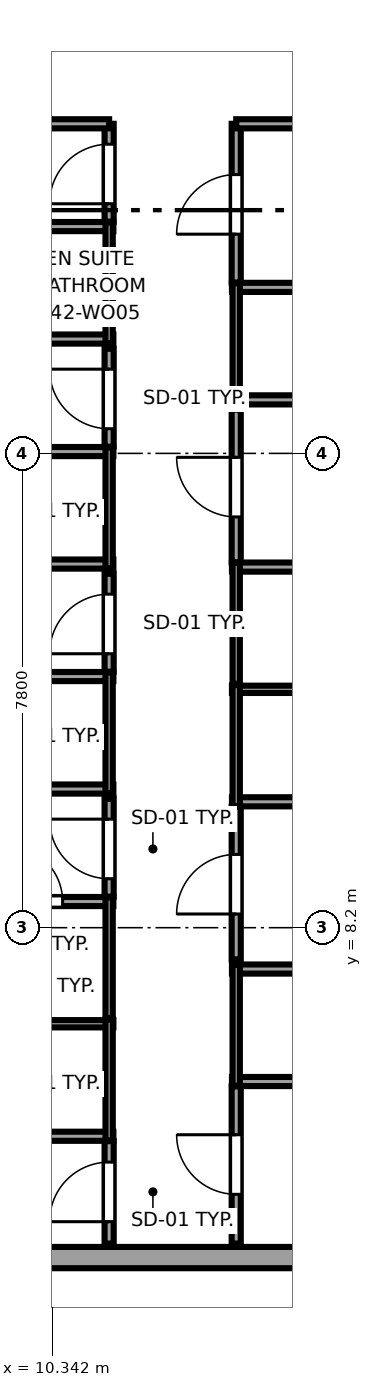
"""IFC4 building model, lengths in metres.
Left out: names, types, materials, properties, quantities, classifications, styles, units other than length and angle.
Written with IfcOpenShell. Run it as: python <this file> out.ifc"""

import sys

from ifc_helpers import new_model, si_unit, direction, frame, frame_2d, origin, place, context, subcontext, project, spatial, rectangle, extrude, source, transform, mapped, element, fill, save


model = new_model("IFC4")
c1 = context("Model", 3, precision=1e-05, world=origin(), true_north=direction((0.0, 1.0)))
c2 = subcontext(c1, "Body", "Model", "MODEL_VIEW")
j1 = project(units=[si_unit("LENGTHUNIT", "METRE"), si_unit("PLANEANGLEUNIT", "RADIAN")], contexts=[c1])
p1 = place(None, origin())
s1 = spatial("IfcSite", under=j1, at=p1, CompositionType="ELEMENT")
p2 = place(p1, origin())
s2 = spatial("IfcBuilding", under=s1, at=p2, CompositionType="ELEMENT")
p3 = place(p2, frame((0.0, 0.0, 161.25)))
s3 = spatial("IfcBuildingStorey", under=s2, at=p3, CompositionType="ELEMENT", Elevation=161.25)
p4 = place(p3, frame((7.017, 2.775, 0.0), z_axis=(0.0, 0.0, 1.0), x_axis=(1.0, 0.0, 0.0)))
e1 = element("IfcWall", 1, at=p4, inside=s3, PredefinedType="SOLIDWALL", context=c2, shape_type="SweptSolid", body=[
    extrude(rectangle(XDim=15.608, YDim=0.35, at=frame_2d((7.804, 0.0))), origin(), (0.0, 0.0, 1.0), 3.37),
])
p5 = place(p4, frame((11.332, 0.0, 0.68)))
e2 = element("IfcOpeningElement", 2, at=p5, cuts=e1, PredefinedType="OPENING", context=c2, shape_type="SweptSolid", body=[
    extrude(rectangle(XDim=2.55, YDim=1.92, at=frame_2d((1.275, 0.96))), frame((0.0, 0.185, 0.0), z_axis=(0.0, -1.0, 0.0), x_axis=(1.0, 0.0, 0.0)), (0.0, 0.0, 1.0), 0.37),
])
p6 = place(p4, frame((1.466, 0.0, 0.62)))
e3 = element("IfcOpeningElement", 3, at=p6, cuts=e1, PredefinedType="OPENING", context=c2, shape_type="SweptSolid", body=[
    extrude(rectangle(XDim=1.5, YDim=1.55, at=frame_2d((0.75, 0.775))), frame((0.0, 0.185, 0.0), z_axis=(0.0, -1.0, 0.0), x_axis=(1.0, 0.0, 0.0)), (0.0, 0.0, 1.0), 0.37),
])
p7 = place(p3, frame((8.76, 4.77, 0.0), z_axis=(0.0, 0.0, 1.0), x_axis=(1.0, 0.0, 0.0)))
e4 = element("IfcWall", 4, at=p7, inside=s3, PredefinedType="PARTITIONING", context=c2, shape_type="SweptSolid", body=[
    extrude(rectangle(XDim=2.59, YDim=0.15, at=frame_2d((1.295, 0.0))), origin(), (0.0, 0.0, 1.0), 3.37),
])
p8 = place(p3, frame((8.76, 6.62, 0.0), z_axis=(0.0, 0.0, 1.0), x_axis=(1.0, 0.0, 0.0)))
e5 = element("IfcWall", 5, at=p8, inside=s3, PredefinedType="PLUMBINGWALL", context=c2, shape_type="SweptSolid", body=[
    extrude(rectangle(XDim=2.59, YDim=0.12, at=frame_2d((1.295, 0.0))), origin(), (0.0, 0.0, 1.0), 3.37),
])
p9 = place(p3, frame((11.28, 4.7, 0.0), z_axis=(0.0, 0.0, 1.0), x_axis=(0.0, 1.0, 0.0)))
e6 = element("IfcWall", 6, at=p9, inside=s3, PredefinedType="PLUMBINGWALL", context=c2, shape_type="SweptSolid", body=[
    extrude(rectangle(XDim=1.99, YDim=0.12, at=frame_2d((0.995, 0.0))), origin(), (0.0, 0.0, 1.0), 3.37),
])
p10 = place(p3, frame((8.76, 8.63, 0.0), z_axis=(0.0, 0.0, 1.0), x_axis=(1.0, 0.0, 0.0)))
e7 = element("IfcWall", 7, at=p10, inside=s3, PredefinedType="PARTITIONING", context=c2, shape_type="SweptSolid", body=[
    extrude(rectangle(XDim=2.59, YDim=0.15, at=frame_2d((1.295, 0.0))), origin(), (0.0, 0.0, 1.0), 3.37),
])
p11 = place(p10, frame((0.835, 0.0, 0.0)))
e8 = element("IfcOpeningElement", 8, at=p11, cuts=e7, PredefinedType="OPENING", context=c2, shape_type="SweptSolid", body=[
    extrude(rectangle(XDim=0.92, YDim=2.01, at=frame_2d((0.46, 1.005))), frame((0.0, 0.085, 0.0), z_axis=(0.0, -1.0, 0.0), x_axis=(1.0, 0.0, 0.0)), (0.0, 0.0, 1.0), 0.17),
])
p12 = place(p3, frame((11.28, 6.71, 0.0), z_axis=(0.0, 0.0, 1.0), x_axis=(0.0, 1.0, 0.0)))
e9 = element("IfcWall", 9, at=p12, inside=s3, PredefinedType="PLUMBINGWALL", context=c2, shape_type="SweptSolid", body=[
    extrude(rectangle(XDim=1.99, YDim=0.12, at=frame_2d((0.995, 0.0))), origin(), (0.0, 0.0, 1.0), 3.001),
])
p13 = place(p3, frame((3.005, 10.48, 0.0), z_axis=(0.0, 0.0, 1.0), x_axis=(1.0, 0.0, 0.0)))
e10 = element("IfcWall", 10, at=p13, inside=s3, PredefinedType="PARTITIONING", context=c2, shape_type="SweptSolid", body=[
    extrude(rectangle(XDim=8.345, YDim=0.15, at=frame_2d((4.173, 0.0))), origin(), (0.0, 0.0, 1.0), 3.37),
])
p14 = place(p3, frame((8.76, 12.33, 0.0), z_axis=(0.0, 0.0, 1.0), x_axis=(1.0, 0.0, 0.0)))
e11 = element("IfcWall", 11, at=p14, inside=s3, PredefinedType="PARTITIONING", context=c2, shape_type="SweptSolid", body=[
    extrude(rectangle(XDim=2.59, YDim=0.15, at=frame_2d((1.295, 0.0))), origin(), (0.0, 0.0, 1.0), 3.37),
])
p15 = place(p3, frame((11.28, 10.41, 0.0), z_axis=(0.0, 0.0, 1.0), x_axis=(0.0, 1.0, 0.0)))
e12 = element("IfcWall", 12, at=p15, inside=s3, PredefinedType="PLUMBINGWALL", context=c2, shape_type="SweptSolid", body=[
    extrude(rectangle(XDim=1.99, YDim=0.12, at=frame_2d((0.995, 0.0))), origin(), (0.0, 0.0, 1.0), 3.001),
])
p16 = place(p3, frame((3.005, 14.18, 0.0), z_axis=(0.0, 0.0, 1.0), x_axis=(1.0, 0.0, 0.0)))
e13 = element("IfcWall", 13, at=p16, inside=s3, PredefinedType="PARTITIONING", context=c2, shape_type="SweptSolid", body=[
    extrude(rectangle(XDim=8.345, YDim=0.15, at=frame_2d((4.173, 0.0))), origin(), (0.0, 0.0, 1.0), 3.37),
])
p17 = place(p3, frame((8.76, 16.03, 0.0), z_axis=(0.0, 0.0, 1.0), x_axis=(1.0, 0.0, 0.0)))
e14 = element("IfcWall", 14, at=p17, inside=s3, PredefinedType="PARTITIONING", context=c2, shape_type="SweptSolid", body=[
    extrude(rectangle(XDim=2.59, YDim=0.15, at=frame_2d((1.295, 0.0))), origin(), (0.0, 0.0, 1.0), 2.758),
])
p18 = place(p3, frame((11.28, 14.11, 0.0), z_axis=(0.0, 0.0, 1.0), x_axis=(0.0, 1.0, 0.0)))
e15 = element("IfcWall", 15, at=p18, inside=s3, PredefinedType="PLUMBINGWALL", context=c2, shape_type="SweptSolid", body=[
    extrude(rectangle(XDim=1.99, YDim=0.12, at=frame_2d((0.995, 0.0))), origin(), (0.0, 0.0, 1.0), 3.001),
])
p19 = place(p3, frame((3.005, 17.88, 0.0), z_axis=(0.0, 0.0, 1.0), x_axis=(1.0, 0.0, 0.0)))
e16 = element("IfcWall", 16, at=p19, inside=s3, PredefinedType="PARTITIONING", context=c2, shape_type="SweptSolid", body=[
    extrude(rectangle(XDim=8.345, YDim=0.15, at=frame_2d((4.173, 0.0))), origin(), (0.0, 0.0, 1.0), 3.37),
])
p20 = place(p3, frame((8.76, 19.73, 0.0), z_axis=(0.0, 0.0, 1.0), x_axis=(1.0, 0.0, 0.0)))
e17 = element("IfcWall", 17, at=p20, inside=s3, PredefinedType="PARTITIONING", context=c2, shape_type="SweptSolid", body=[
    extrude(rectangle(XDim=2.59, YDim=0.15, at=frame_2d((1.295, 0.0))), origin(), (0.0, 0.0, 1.0), 3.37),
])
p21 = place(p3, frame((11.28, 17.81, 0.0), z_axis=(0.0, 0.0, 1.0), x_axis=(0.0, 1.0, 0.0)))
e18 = element("IfcWall", 18, at=p21, inside=s3, PredefinedType="PLUMBINGWALL", context=c2, shape_type="SweptSolid", body=[
    extrude(rectangle(XDim=1.99, YDim=0.12, at=frame_2d((0.995, 0.0))), origin(), (0.0, 0.0, 1.0), 3.001),
])
for number, where, z_axis, x_axis in (
    (19, (13.3, 5.67, 0.0), (0.0, 0.0, 1.0), (1.0, 0.0, 0.0)),
    (20, (13.3, 7.52, 0.0), (0.0, 0.0, 1.0), (1.0, 0.0, 0.0)),
):
    element("IfcWall", number, at=place(p3, frame(where, z_axis=z_axis, x_axis=x_axis)), inside=s3, PredefinedType="PARTITIONING", context=c2, shape_type="SweptSolid", body=[
        extrude(rectangle(XDim=2.59, YDim=0.15, at=frame_2d((1.295, 0.0))), origin(), (0.0, 0.0, 1.0), 3.37),
    ])
p22 = place(p3, frame((13.37, 5.6, 0.0), z_axis=(0.0, 0.0, 1.0), x_axis=(0.0, 1.0, 0.0)))
e21 = element("IfcWall", 21, at=p22, inside=s3, PredefinedType="PLUMBINGWALL", context=c2, shape_type="SweptSolid", body=[
    extrude(rectangle(XDim=1.99, YDim=0.12, at=frame_2d((0.995, 0.0))), origin(), (0.0, 0.0, 1.0), 3.37),
])
p23 = place(p3, frame((13.3, 10.27, 0.0), z_axis=(0.0, 0.0, 1.0), x_axis=(1.0, 0.0, 0.0)))
e22 = element("IfcWall", 22, at=p23, inside=s3, PredefinedType="PARTITIONING", context=c2, shape_type="SweptSolid", body=[
    extrude(rectangle(XDim=2.59, YDim=0.15, at=frame_2d((1.295, 0.0))), origin(), (0.0, 0.0, 1.0), 3.37),
])
p24 = place(p3, frame((13.3, 12.12, 0.0), z_axis=(0.0, 0.0, 1.0), x_axis=(1.0, 0.0, 0.0)))
e23 = element("IfcWall", 23, at=p24, inside=s3, PredefinedType="PLUMBINGWALL", context=c2, shape_type="SweptSolid", body=[
    extrude(rectangle(XDim=2.59, YDim=0.12, at=frame_2d((1.295, 0.0))), origin(), (0.0, 0.0, 1.0), 3.37),
])
p25 = place(p3, frame((13.37, 10.2, 0.0), z_axis=(0.0, 0.0, 1.0), x_axis=(0.0, 1.0, 0.0)))
e24 = element("IfcWall", 24, at=p25, inside=s3, PredefinedType="PLUMBINGWALL", context=c2, shape_type="SweptSolid", body=[
    extrude(rectangle(XDim=1.99, YDim=0.12, at=frame_2d((0.995, 0.0))), origin(), (0.0, 0.0, 1.0), 3.37),
])
p26 = place(p3, frame((13.3, 14.13, 0.0), z_axis=(0.0, 0.0, 1.0), x_axis=(1.0, 0.0, 0.0)))
e25 = element("IfcWall", 25, at=p26, inside=s3, PredefinedType="PARTITIONING", context=c2, shape_type="SweptSolid", body=[
    extrude(rectangle(XDim=2.59, YDim=0.15, at=frame_2d((1.295, 0.0))), origin(), (0.0, 0.0, 1.0), 3.37),
])
p27 = place(p3, frame((13.37, 12.21, 0.0), z_axis=(0.0, 0.0, 1.0), x_axis=(0.0, 1.0, 0.0)))
e26 = element("IfcWall", 26, at=p27, inside=s3, PredefinedType="PLUMBINGWALL", context=c2, shape_type="SweptSolid", body=[
    extrude(rectangle(XDim=1.99, YDim=0.12, at=frame_2d((0.995, 0.0))), origin(), (0.0, 0.0, 1.0), 3.37),
])
p28 = place(p3, frame((13.3, 16.88, 0.0), z_axis=(0.0, 0.0, 1.0), x_axis=(1.0, 0.0, 0.0)))
e27 = element("IfcWall", 27, at=p28, inside=s3, PredefinedType="PARTITIONING", context=c2, shape_type="SweptSolid", body=[
    extrude(rectangle(XDim=9.05, YDim=0.15, at=frame_2d((4.525, 0.0))), origin(), (0.0, 0.0, 1.0), 3.37),
])
p29 = place(p3, frame((13.3, 18.73, 0.0), z_axis=(0.0, 0.0, 1.0), x_axis=(1.0, 0.0, 0.0)))
e28 = element("IfcWall", 28, at=p29, inside=s3, PredefinedType="PARTITIONING", context=c2, shape_type="SweptSolid", body=[
    extrude(rectangle(XDim=2.59, YDim=0.15, at=frame_2d((1.295, 0.0))), origin(), (0.0, 0.0, 1.0), 3.37),
])
p30 = place(p3, frame((13.37, 16.81, 0.0), z_axis=(0.0, 0.0, 1.0), x_axis=(0.0, 1.0, 0.0)))
e29 = element("IfcWall", 29, at=p30, inside=s3, PredefinedType="PLUMBINGWALL", context=c2, shape_type="SweptSolid", body=[
    extrude(rectangle(XDim=1.99, YDim=0.12, at=frame_2d((0.995, 0.0))), origin(), (0.0, 0.0, 1.0), 3.37),
])
p31 = place(p3, frame((11.28, 3.005, 0.0), z_axis=(0.0, 0.0, 1.0), x_axis=(0.0, 1.0, 0.0)))
e30 = element("IfcWall", 30, at=p31, inside=s3, PredefinedType="PARTITIONING", context=c2, shape_type="SweptSolid", body=[
    extrude(rectangle(XDim=1.685, YDim=0.15, at=frame_2d((0.843, 0.0))), origin(), (0.0, 0.0, 1.0), 3.37),
])
p32 = place(p31, frame((0.36, 0.0, 0.0)))
e31 = element("IfcOpeningElement", 31, at=p32, cuts=e30, PredefinedType="OPENING", context=c2, shape_type="SweptSolid", body=[
    extrude(rectangle(XDim=0.98, YDim=2.12, at=frame_2d((0.49, 1.06))), frame((0.0, 0.085, 0.0), z_axis=(0.0, -1.0, 0.0), x_axis=(1.0, 0.0, 0.0)), (0.0, 0.0, 1.0), 0.17),
])
p33 = place(p3, frame((11.28, 8.71, 0.0), z_axis=(0.0, 0.0, 1.0), x_axis=(0.0, 1.0, 0.0)))
e32 = element("IfcWall", 32, at=p33, inside=s3, PredefinedType="PARTITIONING", context=c2, shape_type="SweptSolid", body=[
    extrude(rectangle(XDim=1.61, YDim=0.15, at=frame_2d((0.805, 0.0))), origin(), (0.0, 0.0, 1.0), 3.001),
])
p34 = place(p33, frame((0.295, 0.0, 0.0)))
e33 = element("IfcOpeningElement", 33, at=p34, cuts=e32, PredefinedType="OPENING", context=c2, shape_type="SweptSolid", body=[
    extrude(rectangle(XDim=0.98, YDim=2.12, at=frame_2d((0.49, 1.06))), frame((0.0, 0.085, 0.0), z_axis=(0.0, -1.0, 0.0), x_axis=(1.0, 0.0, 0.0)), (0.0, 0.0, 1.0), 0.17),
])
p35 = place(p3, frame((11.28, 12.41, 0.0), z_axis=(0.0, 0.0, 1.0), x_axis=(0.0, 1.0, 0.0)))
e34 = element("IfcWall", 34, at=p35, inside=s3, PredefinedType="PARTITIONING", context=c2, shape_type="SweptSolid", body=[
    extrude(rectangle(XDim=1.61, YDim=0.15, at=frame_2d((0.805, 0.0))), origin(), (0.0, 0.0, 1.0), 3.001),
])
p36 = place(p35, frame((0.295, 0.0, 0.0)))
e35 = element("IfcOpeningElement", 35, at=p36, cuts=e34, PredefinedType="OPENING", context=c2, shape_type="SweptSolid", body=[
    extrude(rectangle(XDim=0.98, YDim=2.12, at=frame_2d((0.49, 1.06))), frame((0.0, 0.085, 0.0), z_axis=(0.0, -1.0, 0.0), x_axis=(1.0, 0.0, 0.0)), (0.0, 0.0, 1.0), 0.17),
])
p37 = place(p3, frame((11.28, 16.11, 0.0), z_axis=(0.0, 0.0, 1.0), x_axis=(0.0, 1.0, 0.0)))
e36 = element("IfcWall", 36, at=p37, inside=s3, PredefinedType="PARTITIONING", context=c2, shape_type="SweptSolid", body=[
    extrude(rectangle(XDim=1.61, YDim=0.15, at=frame_2d((0.805, 0.0))), origin(), (0.0, 0.0, 1.0), 3.001),
])
p38 = place(p37, frame((0.295, 0.0, 0.0)))
e37 = element("IfcOpeningElement", 37, at=p38, cuts=e36, PredefinedType="OPENING", context=c2, shape_type="SweptSolid", body=[
    extrude(rectangle(XDim=0.98, YDim=2.12, at=frame_2d((0.49, 1.06))), frame((0.0, 0.085, 0.0), z_axis=(0.0, -1.0, 0.0), x_axis=(1.0, 0.0, 0.0)), (0.0, 0.0, 1.0), 0.17),
])
p39 = place(p3, frame((11.28, 19.81, 0.0), z_axis=(0.0, 0.0, 1.0), x_axis=(0.0, 1.0, 0.0)))
e38 = element("IfcWall", 38, at=p39, inside=s3, PredefinedType="PARTITIONING", context=c2, shape_type="SweptSolid", body=[
    extrude(rectangle(XDim=1.61, YDim=0.15, at=frame_2d((0.805, 0.0))), origin(), (0.0, 0.0, 1.0), 3.001),
])
p40 = place(p39, frame((0.295, 0.0, 0.0)))
e39 = element("IfcOpeningElement", 39, at=p40, cuts=e38, PredefinedType="OPENING", context=c2, shape_type="SweptSolid", body=[
    extrude(rectangle(XDim=0.98, YDim=2.12, at=frame_2d((0.49, 1.06))), frame((0.0, 0.085, 0.0), z_axis=(0.0, -1.0, 0.0), x_axis=(1.0, 0.0, 0.0)), (0.0, 0.0, 1.0), 0.17),
])
p41 = place(p3, frame((3.005, 21.42, 0.0), z_axis=(0.0, 0.0, 1.0), x_axis=(1.0, 0.0, 0.0)))
e40 = element("IfcWall", 40, at=p41, inside=s3, PredefinedType="PARTITIONING", context=c2, shape_type="SweptSolid", body=[
    extrude(rectangle(XDim=8.275, YDim=0.15, at=frame_2d((4.138, 0.0))), origin(), (0.0, 0.0, 1.0), 3.37),
])
p42 = place(p3, frame((13.37, 3.005, 0.0), z_axis=(0.0, 0.0, 1.0), x_axis=(0.0, 1.0, 0.0)))
e41 = element("IfcWall", 41, at=p42, inside=s3, PredefinedType="PARTITIONING", context=c2, shape_type="SweptSolid", body=[
    extrude(rectangle(XDim=2.585, YDim=0.15, at=frame_2d((1.292, 0.0))), origin(), (0.0, 0.0, 1.0), 3.37),
])
p43 = place(p42, frame((0.81, 0.0, 0.0)))
e42 = element("IfcOpeningElement", 42, at=p43, cuts=e41, PredefinedType="OPENING", context=c2, shape_type="SweptSolid", body=[
    extrude(rectangle(XDim=0.98, YDim=2.12, at=frame_2d((0.49, 1.06))), frame((0.0, 0.085, 0.0), z_axis=(0.0, -1.0, 0.0), x_axis=(1.0, 0.0, 0.0)), (0.0, 0.0, 1.0), 0.17),
])
p44 = place(p3, frame((13.37, 7.68, 0.0), z_axis=(0.0, 0.0, 1.0), x_axis=(0.0, 1.0, 0.0)))
e43 = element("IfcWall", 43, at=p44, inside=s3, PredefinedType="PARTITIONING", context=c2, shape_type="SweptSolid", body=[
    extrude(rectangle(XDim=2.51, YDim=0.15, at=frame_2d((1.255, 0.0))), origin(), (0.0, 0.0, 1.0), 3.37),
])
p45 = place(p44, frame((0.745, 0.0, 0.0)))
e44 = element("IfcOpeningElement", 44, at=p45, cuts=e43, PredefinedType="OPENING", context=c2, shape_type="SweptSolid", body=[
    extrude(rectangle(XDim=0.98, YDim=2.12, at=frame_2d((0.49, 1.06))), frame((0.0, 0.085, 0.0), z_axis=(0.0, -1.0, 0.0), x_axis=(1.0, 0.0, 0.0)), (0.0, 0.0, 1.0), 0.17),
])
p46 = place(p3, frame((13.37, 14.21, 0.0), z_axis=(0.0, 0.0, 1.0), x_axis=(0.0, 1.0, 0.0)))
e45 = element("IfcWall", 45, at=p46, inside=s3, PredefinedType="PARTITIONING", context=c2, shape_type="SweptSolid", body=[
    extrude(rectangle(XDim=2.51, YDim=0.15, at=frame_2d((1.255, 0.0))), origin(), (0.0, 0.0, 1.0), 3.37),
])
p47 = place(p46, frame((0.745, 0.0, 0.0)))
e46 = element("IfcOpeningElement", 46, at=p47, cuts=e45, PredefinedType="OPENING", context=c2, shape_type="SweptSolid", body=[
    extrude(rectangle(XDim=0.98, YDim=2.12, at=frame_2d((0.49, 1.06))), frame((0.0, 0.085, 0.0), z_axis=(0.0, -1.0, 0.0), x_axis=(1.0, 0.0, 0.0)), (0.0, 0.0, 1.0), 0.17),
])
p48 = place(p3, frame((13.37, 18.81, 0.0), z_axis=(0.0, 0.0, 1.0), x_axis=(0.0, 1.0, 0.0)))
e47 = element("IfcWall", 47, at=p48, inside=s3, PredefinedType="PARTITIONING", context=c2, shape_type="SweptSolid", body=[
    extrude(rectangle(XDim=2.61, YDim=0.15, at=frame_2d((1.305, 0.0))), origin(), (0.0, 0.0, 1.0), 3.37),
])
p49 = place(p48, frame((0.795, 0.0, 0.0)))
e48 = element("IfcOpeningElement", 48, at=p49, cuts=e47, PredefinedType="OPENING", context=c2, shape_type="SweptSolid", body=[
    extrude(rectangle(XDim=0.98, YDim=2.12, at=frame_2d((0.49, 1.06))), frame((0.0, 0.085, 0.0), z_axis=(0.0, -1.0, 0.0), x_axis=(1.0, 0.0, 0.0)), (0.0, 0.0, 1.0), 0.17),
])
p50 = place(p3, frame((13.37, 21.42, 0.0), z_axis=(0.0, 0.0, 1.0), x_axis=(1.0, 0.0, 0.0)))
e49 = element("IfcWall", 49, at=p50, inside=s3, PredefinedType="PARTITIONING", context=c2, shape_type="SweptSolid", body=[
    extrude(rectangle(XDim=8.98, YDim=0.15, at=frame_2d((4.49, 0.0))), origin(), (0.0, 0.0, 1.0), 3.37),
])
m1 = source(origin(), c2, "Body", "SweptSolid", [
    extrude(rectangle(XDim=0.92, YDim=2.01, at=frame_2d((0.46, 1.005))), frame((0.0, 0.025, 0.0), z_axis=(0.0, -1.0, 0.0), x_axis=(1.0, 0.0, 0.0)), (0.0, 0.0, 1.0), 0.05),
])
p51 = place(p11, origin())
e50 = element("IfcDoor", 50, at=p51, inside=s3, OperationType="SINGLE_SWING_LEFT", PredefinedType="DOOR", context=c2, shape_type="MappedRepresentation", body=[
    mapped(m1, transform((0.0, 0.0, 0.0), x_axis=(1.0, 0.0, 0.0), y_axis=(0.0, 1.0, 0.0), z_axis=(0.0, 0.0, 1.0), scale=1.0)),
])
fill(e8, e50)
m2 = source(origin(), c2, "Body", "SweptSolid", [
    extrude(rectangle(XDim=0.98, YDim=2.12, at=frame_2d((0.49, 1.06))), frame((0.0, 0.025, 0.0), z_axis=(0.0, -1.0, 0.0), x_axis=(1.0, 0.0, 0.0)), (0.0, 0.0, 1.0), 0.05),
])
p52 = place(p32, origin())
e51 = element("IfcDoor", 51, at=p52, inside=s3, OperationType="SINGLE_SWING_LEFT", PredefinedType="DOOR", context=c2, shape_type="MappedRepresentation", body=[
    mapped(m2, transform((0.0, 0.0, 0.0), x_axis=(1.0, 0.0, 0.0), y_axis=(0.0, 1.0, 0.0), z_axis=(0.0, 0.0, 1.0), scale=1.0)),
])
fill(e31, e51)
p53 = place(p34, origin())
e52 = element("IfcDoor", 52, at=p53, inside=s3, OperationType="SINGLE_SWING_RIGHT", PredefinedType="DOOR", context=c2, shape_type="MappedRepresentation", body=[
    mapped(m2, transform((0.0, 0.0, 0.0), x_axis=(1.0, 0.0, 0.0), y_axis=(0.0, 1.0, 0.0), z_axis=(0.0, 0.0, 1.0), scale=1.0)),
])
fill(e33, e52)
p54 = place(p36, origin())
e53 = element("IfcDoor", 53, at=p54, inside=s3, OperationType="SINGLE_SWING_LEFT", PredefinedType="DOOR", context=c2, shape_type="MappedRepresentation", body=[
    mapped(m2, transform((0.0, 0.0, 0.0), x_axis=(1.0, 0.0, 0.0), y_axis=(0.0, 1.0, 0.0), z_axis=(0.0, 0.0, 1.0), scale=1.0)),
])
fill(e35, e53)
p55 = place(p38, origin())
e54 = element("IfcDoor", 54, at=p55, inside=s3, OperationType="SINGLE_SWING_RIGHT", PredefinedType="DOOR", context=c2, shape_type="MappedRepresentation", body=[
    mapped(m2, transform((0.0, 0.0, 0.0), x_axis=(1.0, 0.0, 0.0), y_axis=(0.0, 1.0, 0.0), z_axis=(0.0, 0.0, 1.0), scale=1.0)),
])
fill(e37, e54)
p56 = place(p40, origin())
e55 = element("IfcDoor", 55, at=p56, inside=s3, OperationType="SINGLE_SWING_LEFT", PredefinedType="DOOR", context=c2, shape_type="MappedRepresentation", body=[
    mapped(m2, transform((0.0, 0.0, 0.0), x_axis=(1.0, 0.0, 0.0), y_axis=(0.0, 1.0, 0.0), z_axis=(0.0, 0.0, 1.0), scale=1.0)),
])
fill(e39, e55)
p57 = place(p43, origin())
e56 = element("IfcDoor", 56, at=p57, inside=s3, OperationType="SINGLE_SWING_RIGHT", PredefinedType="DOOR", context=c2, shape_type="MappedRepresentation", body=[
    mapped(m2, transform((0.0, 0.0, 0.0), x_axis=(1.0, 0.0, 0.0), y_axis=(0.0, 1.0, 0.0), z_axis=(0.0, 0.0, 1.0), scale=1.0)),
])
fill(e42, e56)
p58 = place(p45, origin())
e57 = element("IfcDoor", 57, at=p58, inside=s3, OperationType="SINGLE_SWING_LEFT", PredefinedType="DOOR", context=c2, shape_type="MappedRepresentation", body=[
    mapped(m2, transform((0.0, 0.0, 0.0), x_axis=(1.0, 0.0, 0.0), y_axis=(0.0, 1.0, 0.0), z_axis=(0.0, 0.0, 1.0), scale=1.0)),
])
fill(e44, e57)
p59 = place(p47, origin())
e58 = element("IfcDoor", 58, at=p59, inside=s3, OperationType="SINGLE_SWING_RIGHT", PredefinedType="DOOR", context=c2, shape_type="MappedRepresentation", body=[
    mapped(m2, transform((0.0, 0.0, 0.0), x_axis=(1.0, 0.0, 0.0), y_axis=(0.0, 1.0, 0.0), z_axis=(0.0, 0.0, 1.0), scale=1.0)),
])
fill(e46, e58)
p60 = place(p49, origin())
e59 = element("IfcDoor", 59, at=p60, inside=s3, OperationType="SINGLE_SWING_LEFT", PredefinedType="DOOR", context=c2, shape_type="MappedRepresentation", body=[
    mapped(m2, transform((0.0, 0.0, 0.0), x_axis=(1.0, 0.0, 0.0), y_axis=(0.0, 1.0, 0.0), z_axis=(0.0, 0.0, 1.0), scale=1.0)),
])
fill(e48, e59)
save(model, sys.argv[1])
